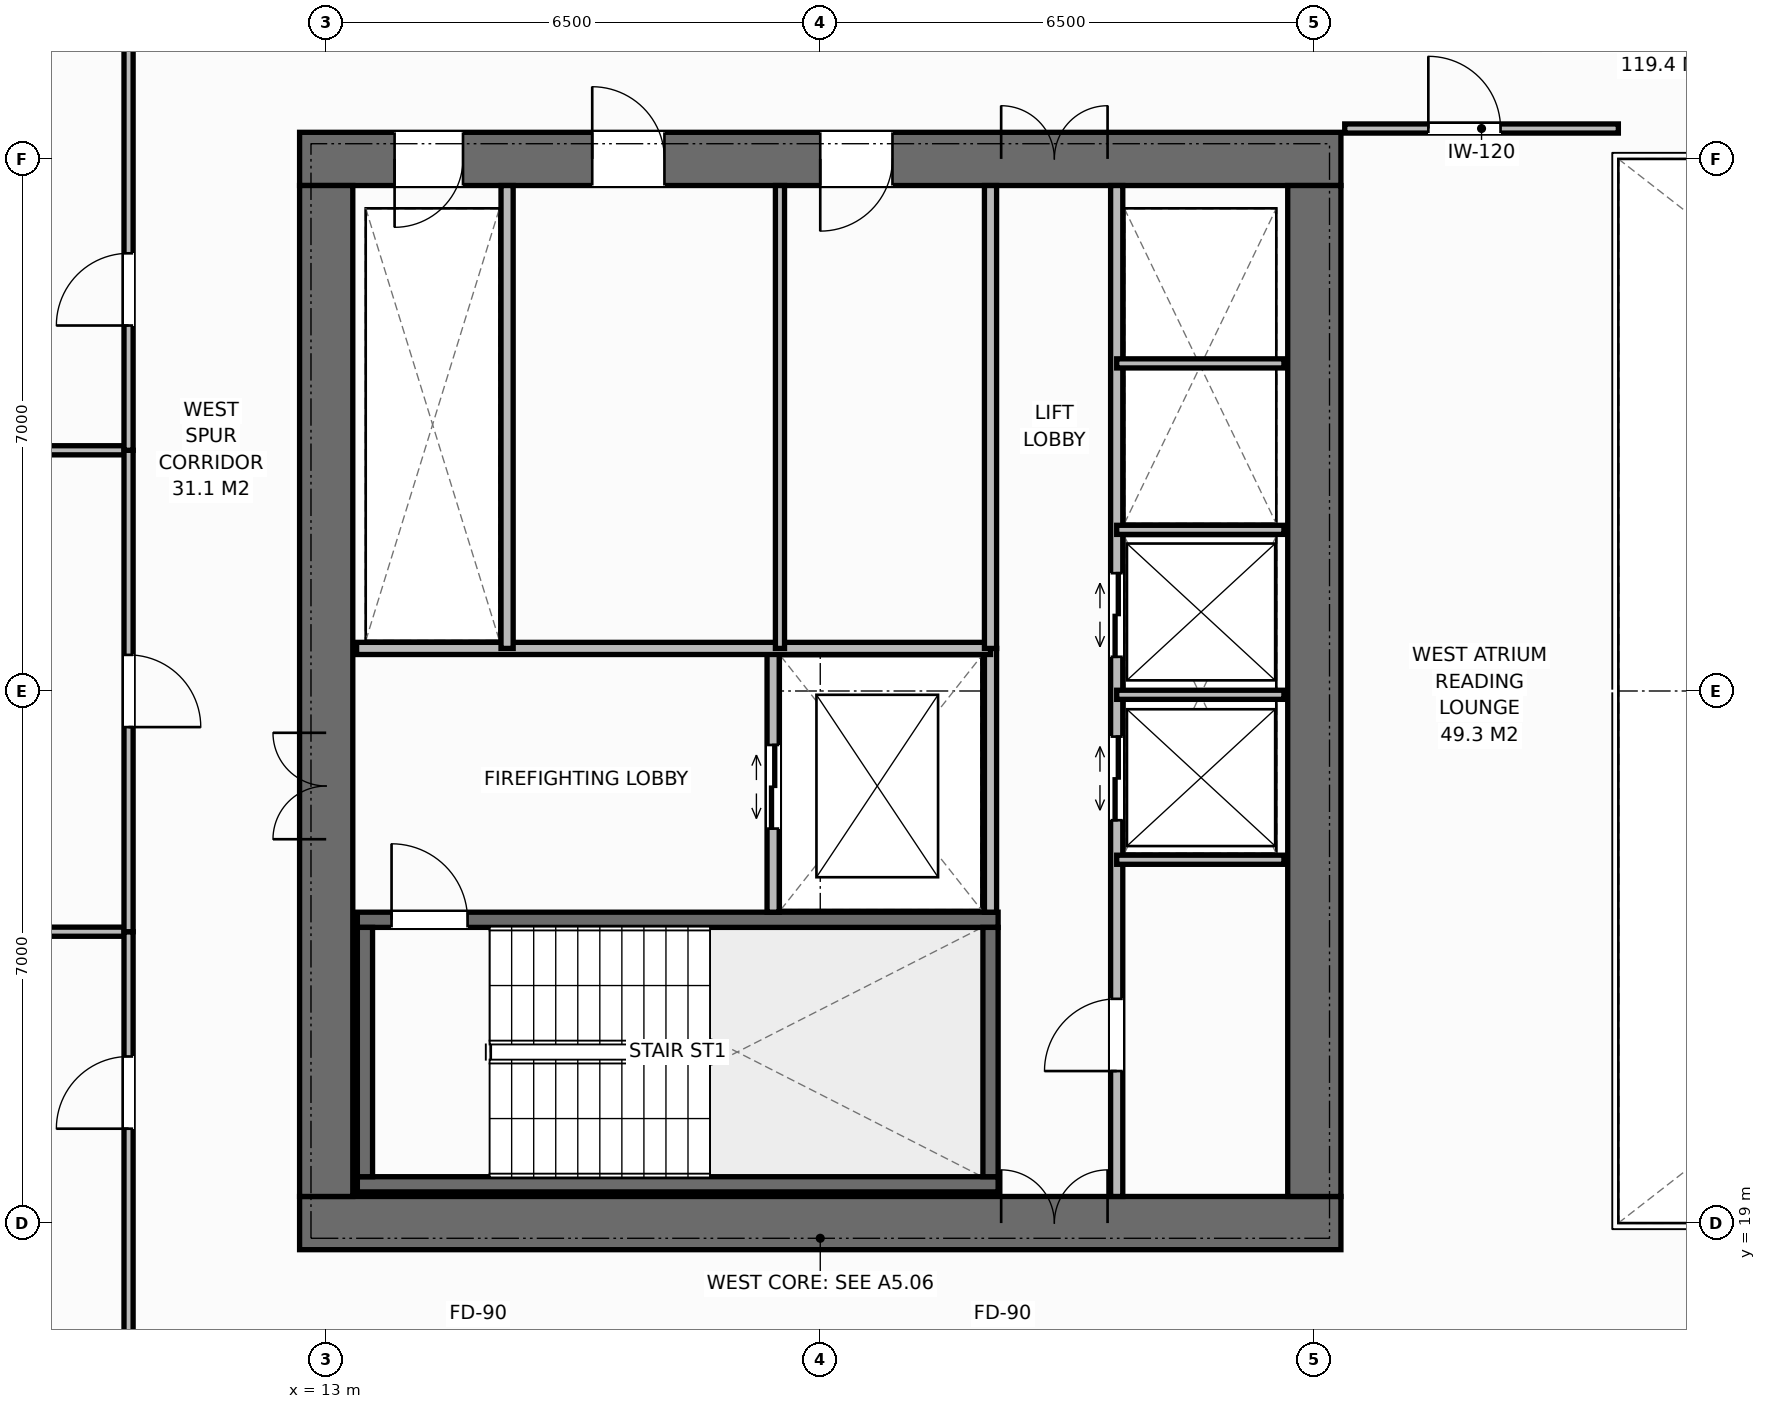
"""IFC4 building model, lengths in metres.
Left out: names, types, materials, properties, quantities, classifications, styles, units other than length and angle.
Written with IfcOpenShell. Run it as: python <this file> out.ifc"""

import sys

from ifc_helpers import new_model, si_unit, direction, frame, frame_2d, origin, place, context, subcontext, project, spatial, rectangle, extrude, element, fill, save


model = new_model("IFC4")
c1 = context("Model", 3, precision=1e-05, world=origin(), true_north=direction((0.0, 1.0)))
c2 = subcontext(c1, "Body", "Model", "MODEL_VIEW")
j1 = project(units=[si_unit("LENGTHUNIT", "METRE"), si_unit("PLANEANGLEUNIT", "RADIAN")], contexts=[c1])
p1 = place(None, origin())
s1 = spatial("IfcSite", under=j1, at=p1, CompositionType="ELEMENT")
p2 = place(p1, origin())
s2 = spatial("IfcBuilding", under=s1, at=p2, CompositionType="ELEMENT")
p3 = place(p2, frame((0.0, 0.0, 124.0)))
s3 = spatial("IfcBuildingStorey", under=s2, at=p3, CompositionType="ELEMENT", Elevation=124.0)
p4 = place(p3, frame((12.65, 19.0, 0.0), z_axis=(0.0, 0.0, 1.0), x_axis=(1.0, 0.0, 0.0)))
e1 = element("IfcWall", 1, at=p4, inside=s3, PredefinedType="SHEAR", context=c2, shape_type="SweptSolid", body=[
    extrude(rectangle(XDim=13.7, YDim=0.7, at=frame_2d((6.85, 0.0))), origin(), (0.0, 0.0, 1.0), 3.8),
])
p5 = place(p4, frame((9.23, 0.0, 0.0)))
e2 = element("IfcOpeningElement", 2, at=p5, cuts=e1, PredefinedType="OPENING", context=c2, shape_type="SweptSolid", body=[
    extrude(rectangle(XDim=1.4, YDim=2.2, at=frame_2d((0.7, 1.1))), frame((0.0, 0.36, 0.0), z_axis=(0.0, -1.0, 0.0), x_axis=(1.0, 0.0, 0.0)), (0.0, 0.0, 1.0), 0.72),
])
p6 = place(p3, frame((12.65, 33.0, 0.0), z_axis=(0.0, 0.0, 1.0), x_axis=(1.0, 0.0, 0.0)))
e3 = element("IfcWall", 3, at=p6, inside=s3, PredefinedType="SHEAR", context=c2, shape_type="SweptSolid", body=[
    extrude(rectangle(XDim=13.7, YDim=0.7, at=frame_2d((6.85, 0.0))), origin(), (0.0, 0.0, 1.0), 3.8),
])
p7 = place(p6, frame((1.25, 0.0, 0.0)))
e4 = element("IfcOpeningElement", 4, at=p7, cuts=e3, PredefinedType="OPENING", context=c2, shape_type="SweptSolid", body=[
    extrude(rectangle(XDim=0.9, YDim=2.15, at=frame_2d((0.45, 1.075))), frame((0.0, 0.36, 0.0), z_axis=(0.0, -1.0, 0.0), x_axis=(1.0, 0.0, 0.0)), (0.0, 0.0, 1.0), 0.72),
])
p8 = place(p6, frame((3.85, 0.0, 0.0)))
e5 = element("IfcOpeningElement", 5, at=p8, cuts=e3, PredefinedType="OPENING", context=c2, shape_type="SweptSolid", body=[
    extrude(rectangle(XDim=0.95, YDim=2.15, at=frame_2d((0.475, 1.075))), frame((0.0, 0.36, 0.0), z_axis=(0.0, -1.0, 0.0), x_axis=(1.0, 0.0, 0.0)), (0.0, 0.0, 1.0), 0.72),
])
p9 = place(p6, frame((6.85, 0.0, 0.0)))
e6 = element("IfcOpeningElement", 6, at=p9, cuts=e3, PredefinedType="OPENING", context=c2, shape_type="SweptSolid", body=[
    extrude(rectangle(XDim=0.95, YDim=2.15, at=frame_2d((0.475, 1.075))), frame((0.0, 0.36, 0.0), z_axis=(0.0, -1.0, 0.0), x_axis=(1.0, 0.0, 0.0)), (0.0, 0.0, 1.0), 0.72),
])
p10 = place(p6, frame((9.23, 0.0, 0.0)))
e7 = element("IfcOpeningElement", 7, at=p10, cuts=e3, PredefinedType="OPENING", context=c2, shape_type="SweptSolid", body=[
    extrude(rectangle(XDim=1.4, YDim=2.2, at=frame_2d((0.7, 1.1))), frame((0.0, 0.36, 0.0), z_axis=(0.0, -1.0, 0.0), x_axis=(1.0, 0.0, 0.0)), (0.0, 0.0, 1.0), 0.72),
])
p11 = place(p3, frame((13.0, 19.35, 0.0), z_axis=(0.0, 0.0, 1.0), x_axis=(0.0, 1.0, 0.0)))
e8 = element("IfcWall", 8, at=p11, inside=s3, PredefinedType="SHEAR", context=c2, shape_type="SweptSolid", body=[
    extrude(rectangle(XDim=13.3, YDim=0.7, at=frame_2d((6.65, 0.0))), origin(), (0.0, 0.0, 1.0), 3.8),
])
p12 = place(p11, frame((4.7, 0.0, 0.0)))
e9 = element("IfcOpeningElement", 9, at=p12, cuts=e8, PredefinedType="OPENING", context=c2, shape_type="SweptSolid", body=[
    extrude(rectangle(XDim=1.4, YDim=2.2, at=frame_2d((0.7, 1.1))), frame((0.0, 0.36, 0.0), z_axis=(0.0, -1.0, 0.0), x_axis=(1.0, 0.0, 0.0)), (0.0, 0.0, 1.0), 0.72),
])
p13 = place(p3, frame((26.0, 19.35, 0.0), z_axis=(0.0, 0.0, 1.0), x_axis=(0.0, 1.0, 0.0)))
e10 = element("IfcWall", 10, at=p13, inside=s3, PredefinedType="SHEAR", context=c2, shape_type="SweptSolid", body=[
    extrude(rectangle(XDim=13.3, YDim=0.7, at=frame_2d((6.65, 0.0))), origin(), (0.0, 0.0, 1.0), 3.8),
])
p14 = place(p3, frame((13.41, 19.51, 0.0), z_axis=(0.0, 0.0, 1.0), x_axis=(1.0, 0.0, 0.0)))
e11 = element("IfcWall", 11, at=p14, inside=s3, PredefinedType="SHEAR", context=c2, shape_type="SweptSolid", body=[
    extrude(rectangle(XDim=8.43, YDim=0.2, at=frame_2d((4.215, 0.0))), origin(), (0.0, 0.0, 1.0), 3.8),
])
p15 = place(p3, frame((13.41, 22.99, 0.0), z_axis=(0.0, 0.0, 1.0), x_axis=(1.0, 0.0, 0.0)))
e12 = element("IfcWall", 12, at=p15, inside=s3, PredefinedType="SHEAR", context=c2, shape_type="SweptSolid", body=[
    extrude(rectangle(XDim=8.43, YDim=0.2, at=frame_2d((4.215, 0.0))), origin(), (0.0, 0.0, 1.0), 3.8),
])
p16 = place(p15, frame((0.45, 0.0, 0.0)))
e13 = element("IfcOpeningElement", 13, at=p16, cuts=e12, PredefinedType="OPENING", context=c2, shape_type="SweptSolid", body=[
    extrude(rectangle(XDim=1.0, YDim=2.15, at=frame_2d((0.5, 1.075))), frame((0.0, 0.11, 0.0), z_axis=(0.0, -1.0, 0.0), x_axis=(1.0, 0.0, 0.0)), (0.0, 0.0, 1.0), 0.22),
])
for number, where, z_axis, x_axis in (
    (14, (13.51, 19.61, 0.0), (0.0, 0.0, 1.0), (0.0, 1.0, 0.0)),
    (15, (21.74, 19.61, 0.0), (0.0, 0.0, 1.0), (0.0, 1.0, 0.0)),
):
    element("IfcWall", number, at=place(p3, frame(where, z_axis=z_axis, x_axis=x_axis)), inside=s3, PredefinedType="SHEAR", context=c2, shape_type="SweptSolid", body=[
        extrude(rectangle(XDim=3.28, YDim=0.2, at=frame_2d((1.64, 0.0))), origin(), (0.0, 0.0, 1.0), 3.8),
    ])
p17 = place(p3, frame((21.74, 23.09, 0.0), z_axis=(0.0, 0.0, 1.0), x_axis=(0.0, 1.0, 0.0)))
e16 = element("IfcWall", 16, at=p17, inside=s3, PredefinedType="STANDARD", context=c2, shape_type="SweptSolid", body=[
    extrude(rectangle(XDim=3.47, YDim=0.16, at=frame_2d((1.735, 0.0))), origin(), (0.0, 0.0, 1.0), 3.565),
])
p18 = place(p3, frame((18.88, 23.09, 0.0), z_axis=(0.0, 0.0, 1.0), x_axis=(0.0, 1.0, 0.0)))
e17 = element("IfcWall", 17, at=p18, inside=s3, PredefinedType="STANDARD", context=c2, shape_type="SweptSolid", body=[
    extrude(rectangle(XDim=3.47, YDim=0.16, at=frame_2d((1.735, 0.0))), origin(), (0.0, 0.0, 1.0), 3.565),
])
p19 = place(p18, frame((1.1, 0.0, 0.0)))
e18 = element("IfcOpeningElement", 18, at=p19, cuts=e17, PredefinedType="OPENING", context=c2, shape_type="SweptSolid", body=[
    extrude(rectangle(XDim=1.1, YDim=2.2, at=frame_2d((0.55, 1.1))), frame((0.0, 0.09, 0.0), z_axis=(0.0, -1.0, 0.0), x_axis=(1.0, 0.0, 0.0)), (0.0, 0.0, 1.0), 0.18),
])
p20 = place(p3, frame((13.4, 26.56, 0.0), z_axis=(0.0, 0.0, 1.0), x_axis=(1.0, 0.0, 0.0)))
e19 = element("IfcWall", 19, at=p20, inside=s3, PredefinedType="STANDARD", context=c2, shape_type="SweptSolid", body=[
    extrude(rectangle(XDim=8.34, YDim=0.16, at=frame_2d((4.17, 0.0))), origin(), (0.0, 0.0, 1.0), 3.565),
])
p21 = place(p3, frame((15.38, 26.56, 0.0), z_axis=(0.0, 0.0, 1.0), x_axis=(0.0, 1.0, 0.0)))
e20 = element("IfcWall", 20, at=p21, inside=s3, PredefinedType="STANDARD", context=c2, shape_type="SweptSolid", body=[
    extrude(rectangle(XDim=6.09, YDim=0.16, at=frame_2d((3.045, 0.0))), origin(), (0.0, 0.0, 1.0), 3.565),
])
p22 = place(p3, frame((18.97, 26.56, 0.0), z_axis=(0.0, 0.0, 1.0), x_axis=(0.0, 1.0, 0.0)))
e21 = element("IfcWall", 21, at=p22, inside=s3, PredefinedType="PARTITIONING", context=c2, shape_type="SweptSolid", body=[
    extrude(rectangle(XDim=6.09, YDim=0.12, at=frame_2d((3.045, 0.0))), origin(), (0.0, 0.0, 1.0), 3.565),
])
p23 = place(p3, frame((21.74, 26.56, 0.0), z_axis=(0.0, 0.0, 1.0), x_axis=(0.0, 1.0, 0.0)))
e22 = element("IfcWall", 22, at=p23, inside=s3, PredefinedType="STANDARD", context=c2, shape_type="SweptSolid", body=[
    extrude(rectangle(XDim=6.09, YDim=0.16, at=frame_2d((3.045, 0.0))), origin(), (0.0, 0.0, 1.0), 3.565),
])
p24 = place(p3, frame((23.4, 19.35, 0.0), z_axis=(0.0, 0.0, 1.0), x_axis=(0.0, 1.0, 0.0)))
e23 = element("IfcWall", 23, at=p24, inside=s3, PredefinedType="STANDARD", context=c2, shape_type="SweptSolid", body=[
    extrude(rectangle(XDim=13.3, YDim=0.16, at=frame_2d((6.65, 0.0))), origin(), (0.0, 0.0, 1.0), 3.565),
])
p25 = place(p24, frame((1.65, 0.0, 0.0)))
e24 = element("IfcOpeningElement", 24, at=p25, cuts=e23, PredefinedType="OPENING", context=c2, shape_type="SweptSolid", body=[
    extrude(rectangle(XDim=0.95, YDim=2.15, at=frame_2d((0.475, 1.075))), frame((0.0, 0.09, 0.0), z_axis=(0.0, -1.0, 0.0), x_axis=(1.0, 0.0, 0.0)), (0.0, 0.0, 1.0), 0.18),
])
p26 = place(p24, frame((4.95, 0.0, 0.0)))
e25 = element("IfcOpeningElement", 25, at=p26, cuts=e23, PredefinedType="OPENING", context=c2, shape_type="SweptSolid", body=[
    extrude(rectangle(XDim=1.1, YDim=2.2, at=frame_2d((0.55, 1.1))), frame((0.0, 0.09, 0.0), z_axis=(0.0, -1.0, 0.0), x_axis=(1.0, 0.0, 0.0)), (0.0, 0.0, 1.0), 0.18),
])
p27 = place(p24, frame((7.1, 0.0, 0.0)))
e26 = element("IfcOpeningElement", 26, at=p27, cuts=e23, PredefinedType="OPENING", context=c2, shape_type="SweptSolid", body=[
    extrude(rectangle(XDim=1.1, YDim=2.2, at=frame_2d((0.55, 1.1))), frame((0.0, 0.09, 0.0), z_axis=(0.0, -1.0, 0.0), x_axis=(1.0, 0.0, 0.0)), (0.0, 0.0, 1.0), 0.18),
])
for number, where, z_axis, x_axis in (
    (27, (23.4, 23.78, 0.0), (0.0, 0.0, 1.0), (1.0, 0.0, 0.0)),
    (28, (23.4, 25.95, 0.0), (0.0, 0.0, 1.0), (1.0, 0.0, 0.0)),
    (29, (23.4, 28.12, 0.0), (0.0, 0.0, 1.0), (1.0, 0.0, 0.0)),
    (30, (23.4, 30.31, 0.0), (0.0, 0.0, 1.0), (1.0, 0.0, 0.0)),
):
    element("IfcWall", number, at=place(p3, frame(where, z_axis=z_axis, x_axis=x_axis)), inside=s3, PredefinedType="PARTITIONING", context=c2, shape_type="SweptSolid", body=[
        extrude(rectangle(XDim=2.2, YDim=0.12, at=frame_2d((1.1, 0.0))), origin(), (0.0, 0.0, 1.0), 3.565),
    ])
p28 = place(p3, frame((26.4, 33.4, 0.0), z_axis=(0.0, 0.0, 1.0), x_axis=(1.0, 0.0, 0.0)))
e31 = element("IfcWall", 31, at=p28, inside=s3, PredefinedType="PARTITIONING", context=c2, shape_type="SweptSolid", body=[
    extrude(rectangle(XDim=3.6, YDim=0.12, at=frame_2d((1.8, 0.0))), origin(), (0.0, 0.0, 1.0), 3.565),
])
p29 = place(p28, frame((1.1, 0.0, 0.0)))
e32 = element("IfcOpeningElement", 32, at=p29, cuts=e31, PredefinedType="OPENING", context=c2, shape_type="SweptSolid", body=[
    extrude(rectangle(XDim=0.95, YDim=2.15, at=frame_2d((0.475, 1.075))), frame((0.0, 0.07, 0.0), z_axis=(0.0, -1.0, 0.0), x_axis=(1.0, 0.0, 0.0)), (0.0, 0.0, 1.0), 0.14),
])
p30 = place(p3, frame((1.82, 22.833, 0.0), z_axis=(0.0, 0.0, 1.0), x_axis=(1.0, 0.0, 0.0)))
e33 = element("IfcWall", 33, at=p30, inside=s3, PredefinedType="PARTITIONING", context=c2, shape_type="SweptSolid", body=[
    extrude(rectangle(XDim=8.58, YDim=0.12, at=frame_2d((4.29, 0.0))), origin(), (0.0, 0.0, 1.0), 3.565),
])
p31 = place(p3, frame((10.4, 16.5, 0.0), z_axis=(0.0, 0.0, 1.0), x_axis=(0.0, 1.0, 0.0)))
e34 = element("IfcWall", 34, at=p31, inside=s3, PredefinedType="PARTITIONING", context=c2, shape_type="SweptSolid", body=[
    extrude(rectangle(XDim=6.333, YDim=0.12, at=frame_2d((3.167, 0.0))), origin(), (0.0, 0.0, 1.0), 3.565),
])
p32 = place(p31, frame((3.742, 0.0, 0.0)))
e35 = element("IfcOpeningElement", 35, at=p32, cuts=e34, PredefinedType="OPENING", context=c2, shape_type="SweptSolid", body=[
    extrude(rectangle(XDim=0.95, YDim=2.15, at=frame_2d((0.475, 1.075))), frame((0.0, 0.07, 0.0), z_axis=(0.0, -1.0, 0.0), x_axis=(1.0, 0.0, 0.0)), (0.0, 0.0, 1.0), 0.14),
])
p33 = place(p3, frame((1.82, 29.167, 0.0), z_axis=(0.0, 0.0, 1.0), x_axis=(1.0, 0.0, 0.0)))
e36 = element("IfcWall", 36, at=p33, inside=s3, PredefinedType="PARTITIONING", context=c2, shape_type="SweptSolid", body=[
    extrude(rectangle(XDim=8.58, YDim=0.12, at=frame_2d((4.29, 0.0))), origin(), (0.0, 0.0, 1.0), 3.565),
])
p34 = place(p3, frame((10.4, 22.833, 0.0), z_axis=(0.0, 0.0, 1.0), x_axis=(0.0, 1.0, 0.0)))
e37 = element("IfcWall", 37, at=p34, inside=s3, PredefinedType="PARTITIONING", context=c2, shape_type="SweptSolid", body=[
    extrude(rectangle(XDim=6.333, YDim=0.12, at=frame_2d((3.167, 0.0))), origin(), (0.0, 0.0, 1.0), 3.565),
])
p35 = place(p34, frame((2.692, 0.0, 0.0)))
e38 = element("IfcOpeningElement", 38, at=p35, cuts=e37, PredefinedType="OPENING", context=c2, shape_type="SweptSolid", body=[
    extrude(rectangle(XDim=0.95, YDim=2.15, at=frame_2d((0.475, 1.075))), frame((0.0, 0.07, 0.0), z_axis=(0.0, -1.0, 0.0), x_axis=(1.0, 0.0, 0.0)), (0.0, 0.0, 1.0), 0.14),
])
p36 = place(p3, frame((10.4, 29.167, 0.0), z_axis=(0.0, 0.0, 1.0), x_axis=(0.0, 1.0, 0.0)))
e39 = element("IfcWall", 39, at=p36, inside=s3, PredefinedType="PARTITIONING", context=c2, shape_type="SweptSolid", body=[
    extrude(rectangle(XDim=6.333, YDim=0.12, at=frame_2d((3.167, 0.0))), origin(), (0.0, 0.0, 1.0), 3.565),
])
p37 = place(p36, frame((1.642, 0.0, 0.0)))
e40 = element("IfcOpeningElement", 40, at=p37, cuts=e39, PredefinedType="OPENING", context=c2, shape_type="SweptSolid", body=[
    extrude(rectangle(XDim=0.95, YDim=2.15, at=frame_2d((0.475, 1.075))), frame((0.0, 0.07, 0.0), z_axis=(0.0, -1.0, 0.0), x_axis=(1.0, 0.0, 0.0)), (0.0, 0.0, 1.0), 0.14),
])
p38 = place(p16, origin())
e41 = element("IfcDoor", 41, at=p38, inside=s3, OperationType="SINGLE_SWING_LEFT", PredefinedType="DOOR", context=c2, shape_type="SweptSolid", body=[
    extrude(rectangle(XDim=1.0, YDim=2.15, at=frame_2d((0.5, 1.075))), frame((0.0, 0.025, 0.0), z_axis=(0.0, -1.0, 0.0), x_axis=(1.0, 0.0, 0.0)), (0.0, 0.0, 1.0), 0.05),
])
fill(e13, e41)
p39 = place(p12, origin())
e42 = element("IfcDoor", 42, at=p39, inside=s3, OperationType="DOUBLE_DOOR_SINGLE_SWING", PredefinedType="DOOR", context=c2, shape_type="SweptSolid", body=[
    extrude(rectangle(XDim=1.4, YDim=2.2, at=frame_2d((0.7, 1.1))), frame((0.0, 0.025, 0.0), z_axis=(0.0, -1.0, 0.0), x_axis=(1.0, 0.0, 0.0)), (0.0, 0.0, 1.0), 0.05),
])
fill(e9, e42)
p40 = place(p19, origin())
e43 = element("IfcDoor", 43, at=p40, inside=s3, OperationType="DOUBLE_DOOR_SLIDING", PredefinedType="DOOR", context=c2, shape_type="SweptSolid", body=[
    extrude(rectangle(XDim=1.1, YDim=2.2, at=frame_2d((0.55, 1.1))), frame((0.0, 0.025, 0.0), z_axis=(0.0, -1.0, 0.0), x_axis=(1.0, 0.0, 0.0)), (0.0, 0.0, 1.0), 0.05),
])
fill(e18, e43)
p41 = place(p7, origin())
e44 = element("IfcDoor", 44, at=p41, inside=s3, OperationType="SINGLE_SWING_RIGHT", PredefinedType="DOOR", context=c2, shape_type="SweptSolid", body=[
    extrude(rectangle(XDim=0.9, YDim=2.15, at=frame_2d((0.45, 1.075))), frame((0.0, -0.075, 0.0), z_axis=(0.0, -1.0, 0.0), x_axis=(1.0, 0.0, 0.0)), (0.0, 0.0, 1.0), 0.05),
])
fill(e4, e44)
p42 = place(p8, origin())
e45 = element("IfcDoor", 45, at=p42, inside=s3, OperationType="SINGLE_SWING_LEFT", PredefinedType="DOOR", context=c2, shape_type="SweptSolid", body=[
    extrude(rectangle(XDim=0.95, YDim=2.15, at=frame_2d((0.475, 1.075))), frame((0.0, -0.075, 0.0), z_axis=(0.0, -1.0, 0.0), x_axis=(1.0, 0.0, 0.0)), (0.0, 0.0, 1.0), 0.05),
])
fill(e5, e45)
p43 = place(p9, origin())
e46 = element("IfcDoor", 46, at=p43, inside=s3, OperationType="SINGLE_SWING_RIGHT", PredefinedType="DOOR", context=c2, shape_type="SweptSolid", body=[
    extrude(rectangle(XDim=0.95, YDim=2.15, at=frame_2d((0.475, 1.075))), frame((0.0, -0.075, 0.0), z_axis=(0.0, -1.0, 0.0), x_axis=(1.0, 0.0, 0.0)), (0.0, 0.0, 1.0), 0.05),
])
fill(e6, e46)
p44 = place(p5, origin())
e47 = element("IfcDoor", 47, at=p44, inside=s3, OperationType="DOUBLE_DOOR_SINGLE_SWING", PredefinedType="DOOR", context=c2, shape_type="SweptSolid", body=[
    extrude(rectangle(XDim=1.4, YDim=2.2, at=frame_2d((0.7, 1.1))), frame((0.0, 0.125, 0.0), z_axis=(0.0, -1.0, 0.0), x_axis=(1.0, 0.0, 0.0)), (0.0, 0.0, 1.0), 0.05),
])
fill(e2, e47)
p45 = place(p10, origin())
e48 = element("IfcDoor", 48, at=p45, inside=s3, OperationType="DOUBLE_DOOR_SINGLE_SWING", PredefinedType="DOOR", context=c2, shape_type="SweptSolid", body=[
    extrude(rectangle(XDim=1.4, YDim=2.2, at=frame_2d((0.7, 1.1))), frame((0.0, -0.075, 0.0), z_axis=(0.0, -1.0, 0.0), x_axis=(1.0, 0.0, 0.0)), (0.0, 0.0, 1.0), 0.05),
])
fill(e7, e48)
p46 = place(p25, origin())
e49 = element("IfcDoor", 49, at=p46, inside=s3, OperationType="SINGLE_SWING_LEFT", PredefinedType="DOOR", context=c2, shape_type="SweptSolid", body=[
    extrude(rectangle(XDim=0.95, YDim=2.15, at=frame_2d((0.475, 1.075))), frame((0.0, 0.025, 0.0), z_axis=(0.0, -1.0, 0.0), x_axis=(1.0, 0.0, 0.0)), (0.0, 0.0, 1.0), 0.05),
])
fill(e24, e49)
p47 = place(p26, origin())
e50 = element("IfcDoor", 50, at=p47, inside=s3, OperationType="DOUBLE_DOOR_SLIDING", PredefinedType="DOOR", context=c2, shape_type="SweptSolid", body=[
    extrude(rectangle(XDim=1.1, YDim=2.2, at=frame_2d((0.55, 1.1))), frame((0.0, 0.025, 0.0), z_axis=(0.0, -1.0, 0.0), x_axis=(1.0, 0.0, 0.0)), (0.0, 0.0, 1.0), 0.05),
])
fill(e25, e50)
p48 = place(p27, origin())
e51 = element("IfcDoor", 51, at=p48, inside=s3, OperationType="DOUBLE_DOOR_SLIDING", PredefinedType="DOOR", context=c2, shape_type="SweptSolid", body=[
    extrude(rectangle(XDim=1.1, YDim=2.2, at=frame_2d((0.55, 1.1))), frame((0.0, 0.025, 0.0), z_axis=(0.0, -1.0, 0.0), x_axis=(1.0, 0.0, 0.0)), (0.0, 0.0, 1.0), 0.05),
])
fill(e26, e51)
p49 = place(p29, origin())
e52 = element("IfcDoor", 52, at=p49, inside=s3, OperationType="SINGLE_SWING_LEFT", PredefinedType="DOOR", context=c2, shape_type="SweptSolid", body=[
    extrude(rectangle(XDim=0.95, YDim=2.15, at=frame_2d((0.475, 1.075))), frame((0.0, 0.025, 0.0), z_axis=(0.0, -1.0, 0.0), x_axis=(1.0, 0.0, 0.0)), (0.0, 0.0, 1.0), 0.05),
])
fill(e32, e52)
p50 = place(p32, origin())
e53 = element("IfcDoor", 53, at=p50, inside=s3, OperationType="SINGLE_SWING_LEFT", PredefinedType="DOOR", context=c2, shape_type="SweptSolid", body=[
    extrude(rectangle(XDim=0.95, YDim=2.15, at=frame_2d((0.475, 1.075))), frame((0.0, 0.025, 0.0), z_axis=(0.0, -1.0, 0.0), x_axis=(1.0, 0.0, 0.0)), (0.0, 0.0, 1.0), 0.05),
])
fill(e35, e53)
p51 = place(p35, origin())
e54 = element("IfcDoor", 54, at=p51, inside=s3, OperationType="SINGLE_SWING_RIGHT", PredefinedType="DOOR", context=c2, shape_type="SweptSolid", body=[
    extrude(rectangle(XDim=0.95, YDim=2.15, at=frame_2d((0.475, 1.075))), frame((0.0, 0.025, 0.0), z_axis=(0.0, -1.0, 0.0), x_axis=(1.0, 0.0, 0.0)), (0.0, 0.0, 1.0), 0.05),
])
fill(e38, e54)
p52 = place(p37, origin())
e55 = element("IfcDoor", 55, at=p52, inside=s3, OperationType="SINGLE_SWING_LEFT", PredefinedType="DOOR", context=c2, shape_type="SweptSolid", body=[
    extrude(rectangle(XDim=0.95, YDim=2.15, at=frame_2d((0.475, 1.075))), frame((0.0, 0.025, 0.0), z_axis=(0.0, -1.0, 0.0), x_axis=(1.0, 0.0, 0.0)), (0.0, 0.0, 1.0), 0.05),
])
fill(e40, e55)
save(model, sys.argv[1])
